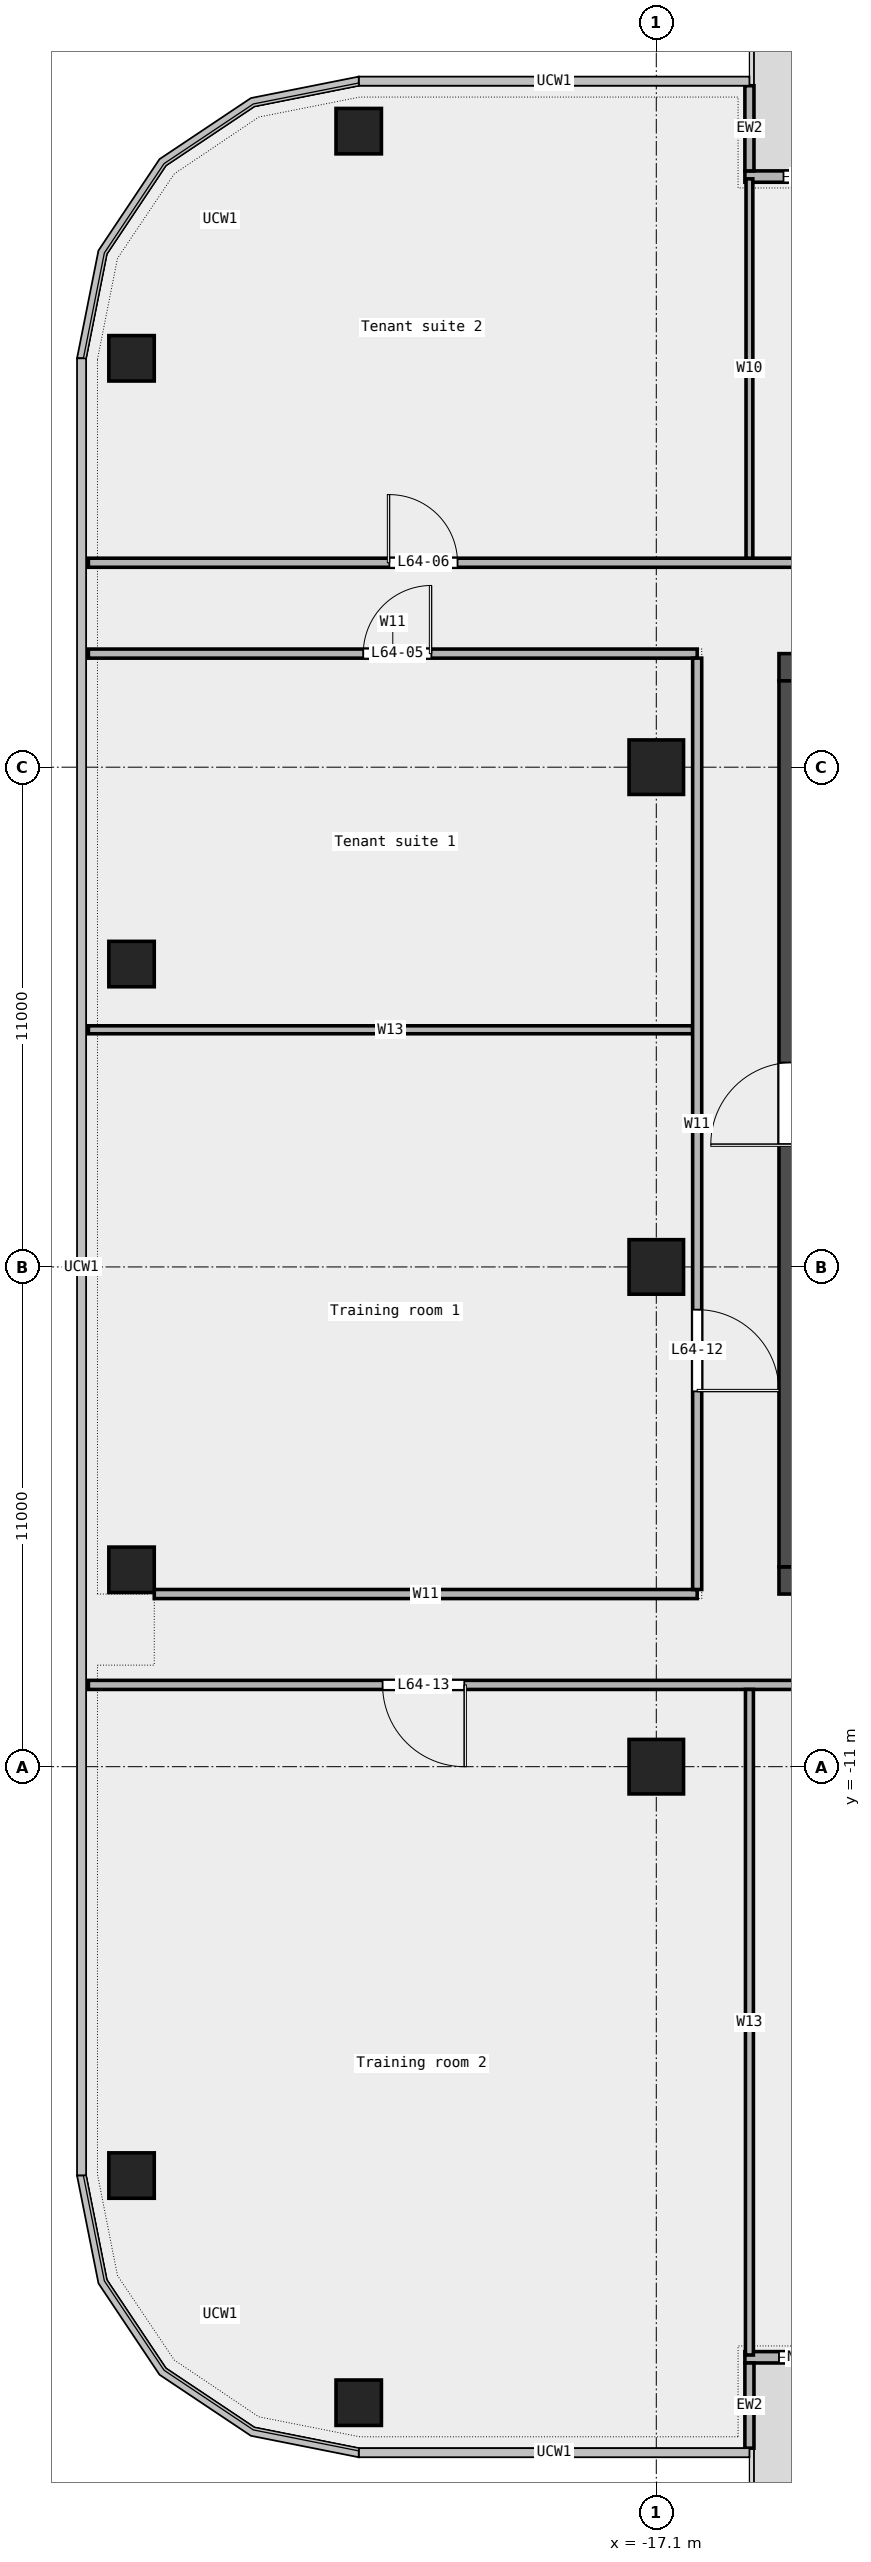
"""IFC4 building model, lengths in metres.
Left out: names, types, materials, properties, quantities, classifications, styles, units other than length and angle.
Written with IfcOpenShell. Run it as: python <this file> out.ifc"""

import sys

from ifc_helpers import new_model, si_unit, direction, frame, frame_2d, origin, origin_2d, place, context, subcontext, project, spatial, rectangle, extrude, element, fill, save


model = new_model("IFC4")
c1 = context("Model", 3, precision=1e-05, world=origin(), true_north=direction((0.0, 1.0)))
c2 = subcontext(c1, "Body", "Model", "MODEL_VIEW")
j1 = project(units=[si_unit("LENGTHUNIT", "METRE"), si_unit("PLANEANGLEUNIT", "RADIAN")], contexts=[c1])
p1 = place(None, origin())
s1 = spatial("IfcSite", under=j1, at=p1, CompositionType="ELEMENT")
p2 = place(p1, origin())
s2 = spatial("IfcBuilding", under=s1, at=p2, CompositionType="ELEMENT")
p3 = place(p2, frame((0.0, 0.0, 295.4)))
s3 = spatial("IfcBuildingStorey", under=s2, at=p3, CompositionType="ELEMENT", Elevation=295.4)
for number, where, z_axis, x_axis in (
    (1, (-23.65, -25.0, 0.0), (0.0, 0.0, 1.0), (1.0, 0.0, 0.0)),
    (2, (-23.65, 25.0, 0.0), (0.0, 0.0, 1.0), (1.0, 0.0, 0.0)),
    (3, (-28.65, 20.0, 0.0), (0.0, 0.0, 1.0), (1.0, 0.0, 0.0)),
    (4, (-28.65, 6.667, 0.0), (0.0, 0.0, 1.0), (1.0, 0.0, 0.0)),
    (5, (-28.65, -6.667, 0.0), (0.0, 0.0, 1.0), (1.0, 0.0, 0.0)),
    (6, (-28.65, -20.0, 0.0), (0.0, 0.0, 1.0), (1.0, 0.0, 0.0)),
):
    element("IfcColumn", number, at=place(p3, frame(where, z_axis=z_axis, x_axis=x_axis)), inside=s3, PredefinedType="COLUMN", context=c2, shape_type="SweptSolid", body=[
        extrude(rectangle(XDim=1.0, YDim=1.0, at=origin_2d()), origin(), (0.0, 0.0, 1.0), 3.6),
    ])
for number, where, z_axis, x_axis in (
    (7, (-17.1, -11.0, 0.0), (0.0, 0.0, 1.0), (1.0, 0.0, 0.0)),
    (8, (-17.1, 0.0, 0.0), (0.0, 0.0, 1.0), (1.0, 0.0, 0.0)),
    (9, (-17.1, 11.0, 0.0), (0.0, 0.0, 1.0), (1.0, 0.0, 0.0)),
):
    element("IfcColumn", number, at=place(p3, frame(where, z_axis=z_axis, x_axis=x_axis)), inside=s3, PredefinedType="COLUMN", context=c2, shape_type="SweptSolid", body=[
        extrude(rectangle(XDim=1.2, YDim=1.2, at=origin_2d()), origin(), (0.0, 0.0, 1.0), 3.6),
    ])
p4 = place(p3, frame((-2.05, 24.0, 0.0), z_axis=(0.0, 0.0, 1.0), x_axis=(-1.0, 0.0, 0.0)))
e10 = element("IfcWall", 10, at=p4, inside=s3, PredefinedType="STANDARD", context=c2, shape_type="SweptSolid", body=[
    extrude(rectangle(XDim=13.1, YDim=0.25, at=frame_2d((6.55, 0.0))), origin(), (0.0, 0.0, 1.0), 3.6),
])
p5 = place(p4, frame((1.5, 0.0, 0.45)))
e11 = element("IfcOpeningElement", 11, at=p5, cuts=e10, PredefinedType="OPENING", context=c2, shape_type="SweptSolid", body=[
    extrude(rectangle(XDim=1.5, YDim=2.4, at=frame_2d((0.75, 1.2))), frame((0.0, 0.137, 0.0), z_axis=(0.0, -1.0, 0.0), x_axis=(1.0, 0.0, 0.0)), (0.0, 0.0, 1.0), 0.274),
])
p6 = place(p4, frame((5.75, 0.0, 0.0)))
e12 = element("IfcOpeningElement", 12, at=p6, cuts=e10, PredefinedType="OPENING", context=c2, shape_type="SweptSolid", body=[
    extrude(rectangle(XDim=1.8, YDim=2.4, at=frame_2d((0.9, 1.2))), frame((0.0, 0.137, 0.0), z_axis=(0.0, -1.0, 0.0), x_axis=(1.0, 0.0, 0.0)), (0.0, 0.0, 1.0), 0.274),
])
p7 = place(p4, frame((10.75, 0.0, 0.45)))
e13 = element("IfcOpeningElement", 13, at=p7, cuts=e10, PredefinedType="OPENING", context=c2, shape_type="SweptSolid", body=[
    extrude(rectangle(XDim=1.5, YDim=2.4, at=frame_2d((0.75, 1.2))), frame((0.0, 0.137, 0.0), z_axis=(0.0, -1.0, 0.0), x_axis=(1.0, 0.0, 0.0)), (0.0, 0.0, 1.0), 0.274),
])
p8 = place(p3, frame((-15.05, 26.0, 0.0), z_axis=(0.0, 0.0, 1.0), x_axis=(0.0, -1.0, 0.0)))
e14 = element("IfcWall", 14, at=p8, inside=s3, PredefinedType="STANDARD", context=c2, shape_type="SweptSolid", body=[
    extrude(rectangle(XDim=1.875, YDim=0.2, at=frame_2d((0.938, 0.0))), origin(), (0.0, 0.0, 1.0), 3.6),
])
p9 = place(p3, frame((-15.15, -24.0, 0.0), z_axis=(0.0, 0.0, 1.0), x_axis=(1.0, 0.0, 0.0)))
e15 = element("IfcWall", 15, at=p9, inside=s3, PredefinedType="STANDARD", context=c2, shape_type="SweptSolid", body=[
    extrude(rectangle(XDim=13.1, YDim=0.25, at=frame_2d((6.55, 0.0))), origin(), (0.0, 0.0, 1.0), 3.6),
])
p10 = place(p9, frame((0.75, 0.0, 0.45)))
e16 = element("IfcOpeningElement", 16, at=p10, cuts=e15, PredefinedType="OPENING", context=c2, shape_type="SweptSolid", body=[
    extrude(rectangle(XDim=1.5, YDim=2.4, at=frame_2d((0.75, 1.2))), frame((0.0, 0.137, 0.0), z_axis=(0.0, -1.0, 0.0), x_axis=(1.0, 0.0, 0.0)), (0.0, 0.0, 1.0), 0.274),
])
p11 = place(p9, frame((5.75, 0.0, 0.0)))
e17 = element("IfcOpeningElement", 17, at=p11, cuts=e15, PredefinedType="OPENING", context=c2, shape_type="SweptSolid", body=[
    extrude(rectangle(XDim=1.8, YDim=2.4, at=frame_2d((0.9, 1.2))), frame((0.0, 0.137, 0.0), z_axis=(0.0, -1.0, 0.0), x_axis=(1.0, 0.0, 0.0)), (0.0, 0.0, 1.0), 0.274),
])
p12 = place(p9, frame((10.0, 0.0, 0.45)))
e18 = element("IfcOpeningElement", 18, at=p12, cuts=e15, PredefinedType="OPENING", context=c2, shape_type="SweptSolid", body=[
    extrude(rectangle(XDim=1.5, YDim=2.4, at=frame_2d((0.75, 1.2))), frame((0.0, 0.137, 0.0), z_axis=(0.0, -1.0, 0.0), x_axis=(1.0, 0.0, 0.0)), (0.0, 0.0, 1.0), 0.274),
])
p13 = place(p3, frame((-15.05, -26.0, 0.0), z_axis=(0.0, 0.0, 1.0), x_axis=(0.0, 1.0, 0.0)))
e19 = element("IfcWall", 19, at=p13, inside=s3, PredefinedType="STANDARD", context=c2, shape_type="SweptSolid", body=[
    extrude(rectangle(XDim=1.875, YDim=0.2, at=frame_2d((0.938, 0.0))), origin(), (0.0, 0.0, 1.0), 3.6),
])
p14 = place(p3, frame((-29.6, -9.2, 0.0), z_axis=(0.0, 0.0, 1.0), x_axis=(1.0, 0.0, 0.0)))
e20 = element("IfcWall", 20, at=p14, inside=s3, PredefinedType="PARTITIONING", context=c2, shape_type="SweptSolid", body=[
    extrude(rectangle(XDim=59.2, YDim=0.2, at=frame_2d((29.6, 0.0))), origin(), (0.0, 0.0, 1.0), 3.6),
])
p15 = place(p14, frame((48.905, 0.0, 0.0)))
e21 = element("IfcOpeningElement", 21, at=p15, cuts=e20, PredefinedType="OPENING", context=c2, shape_type="SweptSolid", body=[
    extrude(rectangle(XDim=1.8, YDim=2.1, at=frame_2d((0.9, 1.05))), frame((0.0, 0.112, 0.0), z_axis=(0.0, -1.0, 0.0), x_axis=(1.0, 0.0, 0.0)), (0.0, 0.0, 1.0), 0.224),
])
p16 = place(p14, frame((36.205, 0.0, 0.0)))
e22 = element("IfcOpeningElement", 22, at=p16, cuts=e20, PredefinedType="OPENING", context=c2, shape_type="SweptSolid", body=[
    extrude(rectangle(XDim=1.8, YDim=2.1, at=frame_2d((0.9, 1.05))), frame((0.0, 0.112, 0.0), z_axis=(0.0, -1.0, 0.0), x_axis=(1.0, 0.0, 0.0)), (0.0, 0.0, 1.0), 0.224),
])
p17 = place(p14, frame((20.1, 0.0, 0.0)))
e23 = element("IfcOpeningElement", 23, at=p17, cuts=e20, PredefinedType="OPENING", context=c2, shape_type="SweptSolid", body=[
    extrude(rectangle(XDim=1.8, YDim=2.1, at=frame_2d((0.9, 1.05))), frame((0.0, 0.112, 0.0), z_axis=(0.0, -1.0, 0.0), x_axis=(1.0, 0.0, 0.0)), (0.0, 0.0, 1.0), 0.224),
])
p18 = place(p14, frame((6.475, 0.0, 0.0)))
e24 = element("IfcOpeningElement", 24, at=p18, cuts=e20, PredefinedType="OPENING", context=c2, shape_type="SweptSolid", body=[
    extrude(rectangle(XDim=1.8, YDim=2.1, at=frame_2d((0.9, 1.05))), frame((0.0, 0.112, 0.0), z_axis=(0.0, -1.0, 0.0), x_axis=(1.0, 0.0, 0.0)), (0.0, 0.0, 1.0), 0.224),
])
p19 = place(p14, frame((28.425, 0.0, 0.0)))
e25 = element("IfcOpeningElement", 25, at=p19, cuts=e20, PredefinedType="OPENING", context=c2, shape_type="SweptSolid", body=[
    extrude(rectangle(XDim=1.2, YDim=2.1, at=frame_2d((0.6, 1.05))), frame((0.0, 0.112, 0.0), z_axis=(0.0, -1.0, 0.0), x_axis=(1.0, 0.0, 0.0)), (0.0, 0.0, 1.0), 0.224),
])
p20 = place(p3, frame((-28.15, -7.2, 0.0), z_axis=(0.0, 0.0, 1.0), x_axis=(1.0, 0.0, 0.0)))
e26 = element("IfcWall", 26, at=p20, inside=s3, PredefinedType="PARTITIONING", context=c2, shape_type="SweptSolid", body=[
    extrude(rectangle(XDim=11.95, YDim=0.2, at=frame_2d((5.975, 0.0))), origin(), (0.0, 0.0, 1.0), 3.6),
])
p21 = place(p3, frame((-29.6, 5.22, 0.0), z_axis=(0.0, 0.0, 1.0), x_axis=(1.0, 0.0, 0.0)))
e27 = element("IfcWall", 27, at=p21, inside=s3, PredefinedType="PARTITIONING", context=c2, shape_type="SweptSolid", body=[
    extrude(rectangle(XDim=13.3, YDim=0.175, at=frame_2d((6.65, 0.0))), origin(), (0.0, 0.0, 1.0), 3.6),
])
p22 = place(p3, frame((-29.6, 13.5, 0.0), z_axis=(0.0, 0.0, 1.0), x_axis=(1.0, 0.0, 0.0)))
e28 = element("IfcWall", 28, at=p22, inside=s3, PredefinedType="PARTITIONING", context=c2, shape_type="SweptSolid", body=[
    extrude(rectangle(XDim=13.4, YDim=0.2, at=frame_2d((6.7, 0.0))), origin(), (0.0, 0.0, 1.0), 3.6),
])
p23 = place(p22, frame((6.05, 0.0, 0.0)))
e29 = element("IfcOpeningElement", 29, at=p23, cuts=e28, PredefinedType="OPENING", context=c2, shape_type="SweptSolid", body=[
    extrude(rectangle(XDim=1.5, YDim=2.1, at=frame_2d((0.75, 1.05))), frame((0.0, 0.112, 0.0), z_axis=(0.0, -1.0, 0.0), x_axis=(1.0, 0.0, 0.0)), (0.0, 0.0, 1.0), 0.224),
])
p24 = place(p3, frame((-29.6, 15.5, 0.0), z_axis=(0.0, 0.0, 1.0), x_axis=(1.0, 0.0, 0.0)))
e30 = element("IfcWall", 30, at=p24, inside=s3, PredefinedType="PARTITIONING", context=c2, shape_type="SweptSolid", body=[
    extrude(rectangle(XDim=59.2, YDim=0.2, at=frame_2d((29.6, 0.0))), origin(), (0.0, 0.0, 1.0), 3.6),
])
p25 = place(p24, frame((48.3, 0.0, 0.0)))
e31 = element("IfcOpeningElement", 31, at=p25, cuts=e30, PredefinedType="OPENING", context=c2, shape_type="SweptSolid", body=[
    extrude(rectangle(XDim=1.8, YDim=2.1, at=frame_2d((0.9, 1.05))), frame((0.0, 0.112, 0.0), z_axis=(0.0, -1.0, 0.0), x_axis=(1.0, 0.0, 0.0)), (0.0, 0.0, 1.0), 0.224),
])
p26 = place(p24, frame((32.675, 0.0, 0.0)))
e32 = element("IfcOpeningElement", 32, at=p26, cuts=e30, PredefinedType="OPENING", context=c2, shape_type="SweptSolid", body=[
    extrude(rectangle(XDim=1.5, YDim=2.1, at=frame_2d((0.75, 1.05))), frame((0.0, 0.112, 0.0), z_axis=(0.0, -1.0, 0.0), x_axis=(1.0, 0.0, 0.0)), (0.0, 0.0, 1.0), 0.224),
])
p27 = place(p24, frame((6.625, 0.0, 0.0)))
e33 = element("IfcOpeningElement", 33, at=p27, cuts=e30, PredefinedType="OPENING", context=c2, shape_type="SweptSolid", body=[
    extrude(rectangle(XDim=1.5, YDim=2.1, at=frame_2d((0.75, 1.05))), frame((0.0, 0.112, 0.0), z_axis=(0.0, -1.0, 0.0), x_axis=(1.0, 0.0, 0.0)), (0.0, 0.0, 1.0), 0.224),
])
p28 = place(p24, frame((20.25, 0.0, 0.0)))
e34 = element("IfcOpeningElement", 34, at=p28, cuts=e30, PredefinedType="OPENING", context=c2, shape_type="SweptSolid", body=[
    extrude(rectangle(XDim=1.5, YDim=2.1, at=frame_2d((0.75, 1.05))), frame((0.0, 0.112, 0.0), z_axis=(0.0, -1.0, 0.0), x_axis=(1.0, 0.0, 0.0)), (0.0, 0.0, 1.0), 0.224),
])
p29 = place(p3, frame((-16.2, -7.1, 0.0), z_axis=(0.0, 0.0, 1.0), x_axis=(0.0, 1.0, 0.0)))
e35 = element("IfcWall", 35, at=p29, inside=s3, PredefinedType="PARTITIONING", context=c2, shape_type="SweptSolid", body=[
    extrude(rectangle(XDim=20.5, YDim=0.2, at=frame_2d((10.25, 0.0))), origin(), (0.0, 0.0, 1.0), 3.6),
])
p30 = place(p29, frame((4.36, 0.0, 0.0)))
e36 = element("IfcOpeningElement", 36, at=p30, cuts=e35, PredefinedType="OPENING", context=c2, shape_type="SweptSolid", body=[
    extrude(rectangle(XDim=1.8, YDim=2.1, at=frame_2d((0.9, 1.05))), frame((0.0, 0.112, 0.0), z_axis=(0.0, -1.0, 0.0), x_axis=(1.0, 0.0, 0.0)), (0.0, 0.0, 1.0), 0.224),
])
p31 = place(p3, frame((-15.05, 15.6, 0.0), z_axis=(0.0, 0.0, 1.0), x_axis=(0.0, 1.0, 0.0)))
e37 = element("IfcWall", 37, at=p31, inside=s3, PredefinedType="PARTITIONING", context=c2, shape_type="SweptSolid", body=[
    extrude(rectangle(XDim=8.35, YDim=0.15, at=frame_2d((4.175, 0.0))), origin(), (0.0, 0.0, 1.0), 3.6),
])
p32 = place(p3, frame((-15.05, -23.95, 0.0), z_axis=(0.0, 0.0, 1.0), x_axis=(0.0, 1.0, 0.0)))
e38 = element("IfcWall", 38, at=p32, inside=s3, PredefinedType="PARTITIONING", context=c2, shape_type="SweptSolid", body=[
    extrude(rectangle(XDim=14.65, YDim=0.175, at=frame_2d((7.325, 0.0))), origin(), (0.0, 0.0, 1.0), 3.6),
])
p33 = place(p3, frame((-14.4, -6.9, 0.0), z_axis=(0.0, 0.0, 1.0), x_axis=(1.0, 0.0, 0.0)))
e39 = element("IfcWall", 39, at=p33, inside=s3, PredefinedType="SHEAR", context=c2, shape_type="SweptSolid", body=[
    extrude(rectangle(XDim=28.8, YDim=0.6, at=frame_2d((14.4, 0.0))), origin(), (0.0, 0.0, 1.0), 3.7),
])
p34 = place(p33, frame((4.712, 0.0, 0.0)))
e40 = element("IfcOpeningElement", 40, at=p34, cuts=e39, PredefinedType="OPENING", context=c2, shape_type="SweptSolid", body=[
    extrude(rectangle(XDim=1.0, YDim=2.1, at=frame_2d((0.5, 1.05))), frame((0.0, 0.312, 0.0), z_axis=(0.0, -1.0, 0.0), x_axis=(1.0, 0.0, 0.0)), (0.0, 0.0, 1.0), 0.624),
])
p35 = place(p33, frame((9.675, 0.0, 0.0)))
e41 = element("IfcOpeningElement", 41, at=p35, cuts=e39, PredefinedType="OPENING", context=c2, shape_type="SweptSolid", body=[
    extrude(rectangle(XDim=1.2, YDim=2.1, at=frame_2d((0.6, 1.05))), frame((0.0, 0.312, 0.0), z_axis=(0.0, -1.0, 0.0), x_axis=(1.0, 0.0, 0.0)), (0.0, 0.0, 1.0), 0.624),
])
p36 = place(p33, frame((15.025, 0.0, 0.0)))
e42 = element("IfcOpeningElement", 42, at=p36, cuts=e39, PredefinedType="OPENING", context=c2, shape_type="SweptSolid", body=[
    extrude(rectangle(XDim=1.0, YDim=2.1, at=frame_2d((0.5, 1.05))), frame((0.0, 0.312, 0.0), z_axis=(0.0, -1.0, 0.0), x_axis=(1.0, 0.0, 0.0)), (0.0, 0.0, 1.0), 0.624),
])
p37 = place(p33, frame((18.75, 0.0, 0.0)))
e43 = element("IfcOpeningElement", 43, at=p37, cuts=e39, PredefinedType="OPENING", context=c2, shape_type="SweptSolid", body=[
    extrude(rectangle(XDim=1.8, YDim=2.1, at=frame_2d((0.9, 1.05))), frame((0.0, 0.312, 0.0), z_axis=(0.0, -1.0, 0.0), x_axis=(1.0, 0.0, 0.0)), (0.0, 0.0, 1.0), 0.624),
])
p38 = place(p33, frame((23.087, 0.0, 0.0)))
e44 = element("IfcOpeningElement", 44, at=p38, cuts=e39, PredefinedType="OPENING", context=c2, shape_type="SweptSolid", body=[
    extrude(rectangle(XDim=1.0, YDim=2.1, at=frame_2d((0.5, 1.05))), frame((0.0, 0.312, 0.0), z_axis=(0.0, -1.0, 0.0), x_axis=(1.0, 0.0, 0.0)), (0.0, 0.0, 1.0), 0.624),
])
p39 = place(p3, frame((-14.4, 13.2, 0.0), z_axis=(0.0, 0.0, 1.0), x_axis=(1.0, 0.0, 0.0)))
e45 = element("IfcWall", 45, at=p39, inside=s3, PredefinedType="SHEAR", context=c2, shape_type="SweptSolid", body=[
    extrude(rectangle(XDim=28.8, YDim=0.6, at=frame_2d((14.4, 0.0))), origin(), (0.0, 0.0, 1.0), 3.7),
])
p40 = place(p39, frame((6.3, 0.0, 0.0)))
e46 = element("IfcOpeningElement", 46, at=p40, cuts=e45, PredefinedType="OPENING", context=c2, shape_type="SweptSolid", body=[
    extrude(rectangle(XDim=1.2, YDim=2.1, at=frame_2d((0.6, 1.05))), frame((0.0, 0.312, 0.0), z_axis=(0.0, -1.0, 0.0), x_axis=(1.0, 0.0, 0.0)), (0.0, 0.0, 1.0), 0.624),
])
p41 = place(p39, frame((21.3, 0.0, 0.0)))
e47 = element("IfcOpeningElement", 47, at=p41, cuts=e45, PredefinedType="OPENING", context=c2, shape_type="SweptSolid", body=[
    extrude(rectangle(XDim=1.2, YDim=2.1, at=frame_2d((0.6, 1.05))), frame((0.0, 0.312, 0.0), z_axis=(0.0, -1.0, 0.0), x_axis=(1.0, 0.0, 0.0)), (0.0, 0.0, 1.0), 0.624),
])
p42 = place(p3, frame((-14.1, -6.6, 0.0), z_axis=(0.0, 0.0, 1.0), x_axis=(0.0, 1.0, 0.0)))
e48 = element("IfcWall", 48, at=p42, inside=s3, PredefinedType="SHEAR", context=c2, shape_type="SweptSolid", body=[
    extrude(rectangle(XDim=19.5, YDim=0.6, at=frame_2d((9.75, 0.0))), origin(), (0.0, 0.0, 1.0), 3.7),
])
p43 = place(p42, frame((9.3, 0.0, 0.0)))
e49 = element("IfcOpeningElement", 49, at=p43, cuts=e48, PredefinedType="OPENING", context=c2, shape_type="SweptSolid", body=[
    extrude(rectangle(XDim=1.8, YDim=2.1, at=frame_2d((0.9, 1.05))), frame((0.0, 0.312, 0.0), z_axis=(0.0, -1.0, 0.0), x_axis=(1.0, 0.0, 0.0)), (0.0, 0.0, 1.0), 0.624),
])
p44 = place(p7, origin())
e50 = element("IfcWindow", 50, at=p44, inside=s3, PartitioningType="SINGLE_PANEL", PredefinedType="WINDOW", context=c2, shape_type="SweptSolid", body=[
    extrude(rectangle(XDim=1.5, YDim=2.4, at=frame_2d((0.75, 1.2))), frame((0.0, 0.03, 0.0), z_axis=(0.0, -1.0, 0.0), x_axis=(1.0, 0.0, 0.0)), (0.0, 0.0, 1.0), 0.06),
])
fill(e13, e50)
p45 = place(p10, origin())
e51 = element("IfcWindow", 51, at=p45, inside=s3, PartitioningType="SINGLE_PANEL", PredefinedType="WINDOW", context=c2, shape_type="SweptSolid", body=[
    extrude(rectangle(XDim=1.5, YDim=2.4, at=frame_2d((0.75, 1.2))), frame((0.0, 0.03, 0.0), z_axis=(0.0, -1.0, 0.0), x_axis=(1.0, 0.0, 0.0)), (0.0, 0.0, 1.0), 0.06),
])
fill(e16, e51)
p46 = place(p23, origin())
e52 = element("IfcDoor", 52, at=p46, inside=s3, OperationType="DOUBLE_DOOR_SINGLE_SWING", PredefinedType="DOOR", context=c2, shape_type="SweptSolid", body=[
    extrude(rectangle(XDim=1.5, YDim=2.1, at=frame_2d((0.75, 1.05))), frame((0.0, 0.025, 0.0), z_axis=(0.0, -1.0, 0.0), x_axis=(1.0, 0.0, 0.0)), (0.0, 0.0, 1.0), 0.05),
])
fill(e29, e52)
p47 = place(p27, origin())
e53 = element("IfcDoor", 53, at=p47, inside=s3, OperationType="DOUBLE_DOOR_SINGLE_SWING", PredefinedType="DOOR", context=c2, shape_type="SweptSolid", body=[
    extrude(rectangle(XDim=1.5, YDim=2.1, at=frame_2d((0.75, 1.05))), frame((0.0, 0.025, 0.0), z_axis=(0.0, -1.0, 0.0), x_axis=(1.0, 0.0, 0.0)), (0.0, 0.0, 1.0), 0.05),
])
fill(e33, e53)
p48 = place(p30, origin())
e54 = element("IfcDoor", 54, at=p48, inside=s3, OperationType="DOUBLE_DOOR_SINGLE_SWING", PredefinedType="DOOR", context=c2, shape_type="SweptSolid", body=[
    extrude(rectangle(XDim=1.8, YDim=2.1, at=frame_2d((0.9, 1.05))), frame((0.0, 0.025, 0.0), z_axis=(0.0, -1.0, 0.0), x_axis=(1.0, 0.0, 0.0)), (0.0, 0.0, 1.0), 0.05),
])
fill(e36, e54)
p49 = place(p18, origin())
e55 = element("IfcDoor", 55, at=p49, inside=s3, OperationType="DOUBLE_DOOR_SINGLE_SWING", PredefinedType="DOOR", context=c2, shape_type="SweptSolid", body=[
    extrude(rectangle(XDim=1.8, YDim=2.1, at=frame_2d((0.9, 1.05))), frame((0.0, 0.025, 0.0), z_axis=(0.0, -1.0, 0.0), x_axis=(1.0, 0.0, 0.0)), (0.0, 0.0, 1.0), 0.05),
])
fill(e24, e55)
save(model, sys.argv[1])
